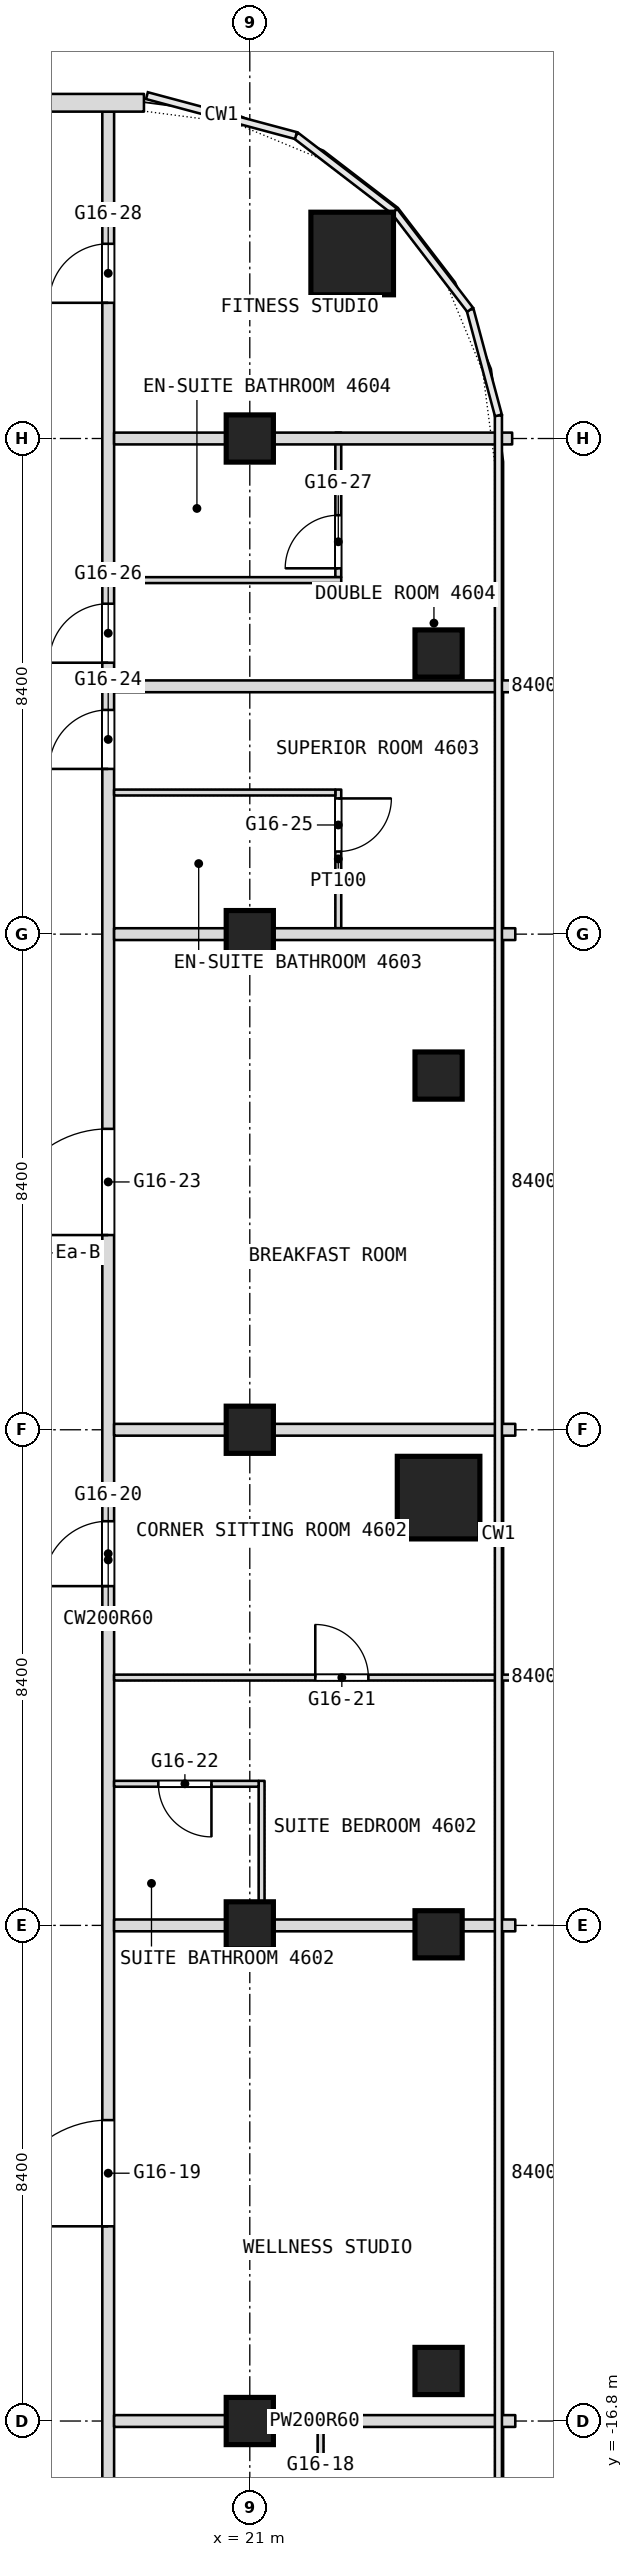
"""IFC4 building model, lengths in metres.
Left out: names, types, materials, properties, quantities, classifications, styles, units other than length and angle.
Written with IfcOpenShell. Run it as: python <this file> out.ifc"""

import sys

from ifc_helpers import new_model, si_unit, direction, frame, frame_2d, origin, origin_2d, place, context, subcontext, project, spatial, rectangle, extrude, element, fill, save


model = new_model("IFC4")
c1 = context("Model", 3, precision=1e-05, world=origin(), true_north=direction((0.0, 1.0)))
c2 = subcontext(c1, "Body", "Model", "MODEL_VIEW")
j1 = project(units=[si_unit("LENGTHUNIT", "METRE"), si_unit("PLANEANGLEUNIT", "RADIAN")], contexts=[c1])
p1 = place(None, origin())
s1 = spatial("IfcSite", under=j1, at=p1, CompositionType="ELEMENT")
p2 = place(p1, origin())
s2 = spatial("IfcBuilding", under=s1, at=p2, CompositionType="ELEMENT")
p3 = place(p2, frame((0.0, 0.0, 202.1)))
s3 = spatial("IfcBuildingStorey", under=s2, at=p3, CompositionType="ELEMENT", Elevation=202.1)
for number, where, z_axis, x_axis in (
    (1, (24.2, -1.15, 0.0), (0.0, 0.0, 1.0), (1.0, 0.0, 0.0)),
    (2, (22.736, 19.936, 0.0), (0.0, 0.0, 1.0), (1.0, 0.0, 0.0)),
):
    element("IfcColumn", number, at=place(p3, frame(where, z_axis=z_axis, x_axis=x_axis)), inside=s3, PredefinedType="COLUMN", context=c2, shape_type="SweptSolid", body=[
        extrude(rectangle(XDim=1.4, YDim=1.4, at=origin_2d()), origin(), (0.0, 0.0, 1.0), 3.6),
    ])
for number, where, z_axis, x_axis in (
    (3, (21.0, -16.8, 0.0), (0.0, 0.0, 1.0), (1.0, 0.0, 0.0)),
    (4, (21.0, -8.4, 0.0), (0.0, 0.0, 1.0), (1.0, 0.0, 0.0)),
    (5, (21.0, 0.0, 0.0), (0.0, 0.0, 1.0), (1.0, 0.0, 0.0)),
    (6, (21.0, 8.4, 0.0), (0.0, 0.0, 1.0), (1.0, 0.0, 0.0)),
    (7, (21.0, 16.8, 0.0), (0.0, 0.0, 1.0), (1.0, 0.0, 0.0)),
    (8, (24.2, 13.156, 0.0), (0.0, 0.0, 1.0), (1.0, 0.0, 0.0)),
    (9, (24.2, 6.003, 0.0), (0.0, 0.0, 1.0), (1.0, 0.0, 0.0)),
    (10, (24.2, -8.551, 0.0), (0.0, 0.0, 1.0), (1.0, 0.0, 0.0)),
    (11, (24.2, -15.952, 0.0), (0.0, 0.0, 1.0), (1.0, 0.0, 0.0)),
):
    element("IfcColumn", number, at=place(p3, frame(where, z_axis=z_axis, x_axis=x_axis)), inside=s3, PredefinedType="COLUMN", context=c2, shape_type="SweptSolid", body=[
        extrude(rectangle(XDim=0.8, YDim=0.8, at=origin_2d()), origin(), (0.0, 0.0, 1.0), 3.6),
    ])
p4 = place(p3, frame((22.5, 8.5, 0.0), z_axis=(0.0, 0.0, 1.0), x_axis=(0.0, 1.0, 0.0)))
e12 = element("IfcWall", 12, at=p4, inside=s3, PredefinedType="PARTITIONING", context=c2, shape_type="SweptSolid", body=[
    extrude(rectangle(XDim=2.35, YDim=0.1, at=frame_2d((1.175, 0.0))), origin(), (0.0, 0.0, 1.0), 3.34),
])
p5 = place(p4, frame((1.3, 0.0, 0.0)))
e13 = element("IfcOpeningElement", 13, at=p5, cuts=e12, PredefinedType="OPENING", context=c2, shape_type="SweptSolid", body=[
    extrude(rectangle(XDim=0.9, YDim=2.1, at=frame_2d((0.45, 1.05))), frame((0.0, 0.05, 0.0), z_axis=(0.0, -1.0, 0.0), x_axis=(1.0, 0.0, 0.0)), (0.0, 0.0, 1.0), 0.1),
])
p6 = place(p3, frame((22.5, 14.45, 0.0), z_axis=(0.0, 0.0, 1.0), x_axis=(0.0, 1.0, 0.0)))
e14 = element("IfcWall", 14, at=p6, inside=s3, PredefinedType="PARTITIONING", context=c2, shape_type="SweptSolid", body=[
    extrude(rectangle(XDim=2.45, YDim=0.1, at=frame_2d((1.225, 0.0))), origin(), (0.0, 0.0, 1.0), 3.34),
])
p7 = place(p6, frame((0.15, 0.0, 0.0)))
e15 = element("IfcOpeningElement", 15, at=p7, cuts=e14, PredefinedType="OPENING", context=c2, shape_type="SweptSolid", body=[
    extrude(rectangle(XDim=0.9, YDim=2.1, at=frame_2d((0.45, 1.05))), frame((0.0, 0.05, 0.0), z_axis=(0.0, -1.0, 0.0), x_axis=(1.0, 0.0, 0.0)), (0.0, 0.0, 1.0), 0.1),
])
p8 = place(p3, frame((22.2, -19.15, 0.0), z_axis=(0.0, 0.0, 1.0), x_axis=(0.0, 1.0, 0.0)))
e16 = element("IfcWall", 16, at=p8, inside=s3, PredefinedType="PARTITIONING", context=c2, shape_type="SweptSolid", body=[
    extrude(rectangle(XDim=2.45, YDim=0.1, at=frame_2d((1.225, 0.0))), origin(), (0.0, 0.0, 1.0), 3.34),
])
p9 = place(p8, frame((0.15, 0.0, 0.0)))
e17 = element("IfcOpeningElement", 17, at=p9, cuts=e16, PredefinedType="OPENING", context=c2, shape_type="SweptSolid", body=[
    extrude(rectangle(XDim=0.9, YDim=2.1, at=frame_2d((0.45, 1.05))), frame((0.0, 0.05, 0.0), z_axis=(0.0, -1.0, 0.0), x_axis=(1.0, 0.0, 0.0)), (0.0, 0.0, 1.0), 0.1),
])
p10 = place(p3, frame((21.2, -8.3, 0.0), z_axis=(0.0, 0.0, 1.0), x_axis=(0.0, 1.0, 0.0)))
e18 = element("IfcWall", 18, at=p10, inside=s3, PredefinedType="PARTITIONING", context=c2, shape_type="SweptSolid", body=[
    extrude(rectangle(XDim=2.35, YDim=0.1, at=frame_2d((1.175, 0.0))), origin(), (0.0, 0.0, 1.0), 3.34),
])
p11 = place(p3, frame((18.6, -26.751, 0.0), z_axis=(0.0, 0.0, 1.0), x_axis=(0.0, 1.0, 0.0)))
e19 = element("IfcWall", 19, at=p11, inside=s3, PredefinedType="PARTITIONING", context=c2, shape_type="SweptSolid", body=[
    extrude(rectangle(XDim=49.091, YDim=0.2, at=frame_2d((24.545, 0.0))), origin(), (0.0, 0.0, 1.0), 3.34),
])
p12 = place(p11, frame((4.576, 0.0, 0.0)))
e20 = element("IfcOpeningElement", 20, at=p12, cuts=e19, PredefinedType="OPENING", context=c2, shape_type="SweptSolid", body=[
    extrude(rectangle(XDim=1.1, YDim=2.1, at=frame_2d((0.55, 1.05))), frame((0.0, 0.1, 0.0), z_axis=(0.0, -1.0, 0.0), x_axis=(1.0, 0.0, 0.0)), (0.0, 0.0, 1.0), 0.2),
])
p13 = place(p11, frame((13.251, 0.0, 0.0)))
e21 = element("IfcOpeningElement", 21, at=p13, cuts=e19, PredefinedType="OPENING", context=c2, shape_type="SweptSolid", body=[
    extrude(rectangle(XDim=1.8, YDim=2.1, at=frame_2d((0.9, 1.05))), frame((0.0, 0.1, 0.0), z_axis=(0.0, -1.0, 0.0), x_axis=(1.0, 0.0, 0.0)), (0.0, 0.0, 1.0), 0.2),
])
p14 = place(p11, frame((24.101, 0.0, 0.0)))
e22 = element("IfcOpeningElement", 22, at=p14, cuts=e19, PredefinedType="OPENING", context=c2, shape_type="SweptSolid", body=[
    extrude(rectangle(XDim=1.1, YDim=2.1, at=frame_2d((0.55, 1.05))), frame((0.0, 0.1, 0.0), z_axis=(0.0, -1.0, 0.0), x_axis=(1.0, 0.0, 0.0)), (0.0, 0.0, 1.0), 0.2),
])
p15 = place(p11, frame((30.051, 0.0, 0.0)))
e23 = element("IfcOpeningElement", 23, at=p15, cuts=e19, PredefinedType="OPENING", context=c2, shape_type="SweptSolid", body=[
    extrude(rectangle(XDim=1.8, YDim=2.1, at=frame_2d((0.9, 1.05))), frame((0.0, 0.1, 0.0), z_axis=(0.0, -1.0, 0.0), x_axis=(1.0, 0.0, 0.0)), (0.0, 0.0, 1.0), 0.2),
])
p16 = place(p11, frame((37.951, 0.0, 0.0)))
e24 = element("IfcOpeningElement", 24, at=p16, cuts=e19, PredefinedType="OPENING", context=c2, shape_type="SweptSolid", body=[
    extrude(rectangle(XDim=1.0, YDim=2.1, at=frame_2d((0.5, 1.05))), frame((0.0, 0.1, 0.0), z_axis=(0.0, -1.0, 0.0), x_axis=(1.0, 0.0, 0.0)), (0.0, 0.0, 1.0), 0.2),
])
p17 = place(p11, frame((39.751, 0.0, 0.0)))
e25 = element("IfcOpeningElement", 25, at=p17, cuts=e19, PredefinedType="OPENING", context=c2, shape_type="SweptSolid", body=[
    extrude(rectangle(XDim=1.0, YDim=2.1, at=frame_2d((0.5, 1.05))), frame((0.0, 0.1, 0.0), z_axis=(0.0, -1.0, 0.0), x_axis=(1.0, 0.0, 0.0)), (0.0, 0.0, 1.0), 0.2),
])
p18 = place(p11, frame((45.851, 0.0, 0.0)))
e26 = element("IfcOpeningElement", 26, at=p18, cuts=e19, PredefinedType="OPENING", context=c2, shape_type="SweptSolid", body=[
    extrude(rectangle(XDim=1.0, YDim=2.1, at=frame_2d((0.5, 1.05))), frame((0.0, 0.1, 0.0), z_axis=(0.0, -1.0, 0.0), x_axis=(1.0, 0.0, 0.0)), (0.0, 0.0, 1.0), 0.2),
])
for number, where, z_axis, x_axis in (
    (27, (18.7, -16.8, 0.0), (0.0, 0.0, 1.0), (1.0, 0.0, 0.0)),
    (28, (18.7, -8.4, 0.0), (0.0, 0.0, 1.0), (1.0, 0.0, 0.0)),
):
    element("IfcWall", number, at=place(p3, frame(where, z_axis=z_axis, x_axis=x_axis)), inside=s3, PredefinedType="PARTITIONING", context=c2, shape_type="SweptSolid", body=[
        extrude(rectangle(XDim=6.8, YDim=0.2, at=frame_2d((3.4, 0.0))), origin(), (0.0, 0.0, 1.0), 2.94),
    ])
p19 = place(p3, frame((18.7, -6.0, 0.0), z_axis=(0.0, 0.0, 1.0), x_axis=(1.0, 0.0, 0.0)))
e29 = element("IfcWall", 29, at=p19, inside=s3, PredefinedType="PARTITIONING", context=c2, shape_type="SweptSolid", body=[
    extrude(rectangle(XDim=2.45, YDim=0.1, at=frame_2d((1.225, 0.0))), origin(), (0.0, 0.0, 1.0), 3.34),
])
p20 = place(p19, frame((0.75, 0.0, 0.0)))
e30 = element("IfcOpeningElement", 30, at=p20, cuts=e29, PredefinedType="OPENING", context=c2, shape_type="SweptSolid", body=[
    extrude(rectangle(XDim=0.9, YDim=2.1, at=frame_2d((0.45, 1.05))), frame((0.0, 0.05, 0.0), z_axis=(0.0, -1.0, 0.0), x_axis=(1.0, 0.0, 0.0)), (0.0, 0.0, 1.0), 0.1),
])
p21 = place(p3, frame((18.7, -4.2, 0.0), z_axis=(0.0, 0.0, 1.0), x_axis=(1.0, 0.0, 0.0)))
e31 = element("IfcWall", 31, at=p21, inside=s3, PredefinedType="PARTITIONING", context=c2, shape_type="SweptSolid", body=[
    extrude(rectangle(XDim=6.8, YDim=0.1, at=frame_2d((3.4, 0.0))), origin(), (0.0, 0.0, 1.0), 3.34),
])
p22 = place(p21, frame((3.41, 0.0, 0.0)))
e32 = element("IfcOpeningElement", 32, at=p22, cuts=e31, PredefinedType="OPENING", context=c2, shape_type="SweptSolid", body=[
    extrude(rectangle(XDim=0.9, YDim=2.1, at=frame_2d((0.45, 1.05))), frame((0.0, 0.05, 0.0), z_axis=(0.0, -1.0, 0.0), x_axis=(1.0, 0.0, 0.0)), (0.0, 0.0, 1.0), 0.1),
])
for number, where, z_axis, x_axis in (
    (33, (18.7, 0.0, 0.0), (0.0, 0.0, 1.0), (1.0, 0.0, 0.0)),
    (34, (18.7, 8.4, 0.0), (0.0, 0.0, 1.0), (1.0, 0.0, 0.0)),
):
    element("IfcWall", number, at=place(p3, frame(where, z_axis=z_axis, x_axis=x_axis)), inside=s3, PredefinedType="PARTITIONING", context=c2, shape_type="SweptSolid", body=[
        extrude(rectangle(XDim=6.8, YDim=0.2, at=frame_2d((3.4, 0.0))), origin(), (0.0, 0.0, 1.0), 2.94),
    ])
p23 = place(p3, frame((18.7, 10.8, 0.0), z_axis=(0.0, 0.0, 1.0), x_axis=(1.0, 0.0, 0.0)))
e35 = element("IfcWall", 35, at=p23, inside=s3, PredefinedType="PARTITIONING", context=c2, shape_type="SweptSolid", body=[
    extrude(rectangle(XDim=3.75, YDim=0.1, at=frame_2d((1.875, 0.0))), origin(), (0.0, 0.0, 1.0), 3.34),
])
p24 = place(p3, frame((18.7, 12.6, 0.0), z_axis=(0.0, 0.0, 1.0), x_axis=(1.0, 0.0, 0.0)))
e36 = element("IfcWall", 36, at=p24, inside=s3, PredefinedType="PARTITIONING", context=c2, shape_type="SweptSolid", body=[
    extrude(rectangle(XDim=6.8, YDim=0.2, at=frame_2d((3.4, 0.0))), origin(), (0.0, 0.0, 1.0), 3.34),
])
p25 = place(p3, frame((18.7, 14.4, 0.0), z_axis=(0.0, 0.0, 1.0), x_axis=(1.0, 0.0, 0.0)))
e37 = element("IfcWall", 37, at=p25, inside=s3, PredefinedType="PARTITIONING", context=c2, shape_type="SweptSolid", body=[
    extrude(rectangle(XDim=3.85, YDim=0.1, at=frame_2d((1.925, 0.0))), origin(), (0.0, 0.0, 1.0), 3.34),
])
p26 = place(p3, frame((18.7, 16.8, 0.0), z_axis=(0.0, 0.0, 1.0), x_axis=(1.0, 0.0, 0.0)))
e38 = element("IfcWall", 38, at=p26, inside=s3, PredefinedType="PARTITIONING", context=c2, shape_type="SweptSolid", body=[
    extrude(rectangle(XDim=6.747, YDim=0.2, at=frame_2d((3.374, 0.0))), origin(), (0.0, 0.0, 1.0), 2.94),
])
p27 = place(p3, frame((19.206, 22.49, 0.0), z_axis=(0.0, 0.0, 1.0), x_axis=(-1.0, 0.0, 0.0)))
e39 = element("IfcWall", 39, at=p27, inside=s3, PredefinedType="NOTDEFINED", context=c2, shape_type="SweptSolid", body=[
    extrude(rectangle(XDim=38.412, YDim=0.3, at=frame_2d((19.206, 0.0))), origin(), (0.0, 0.0, 1.0), 3.6),
])
p28 = place(p27, frame((3.306, 0.0, 0.9)))
e40 = element("IfcOpeningElement", 40, at=p28, cuts=e39, PredefinedType="OPENING", context=c2, shape_type="SweptSolid", body=[
    extrude(rectangle(XDim=2.4, YDim=2.1, at=frame_2d((1.2, 1.05))), frame((0.0, 0.15, 0.0), z_axis=(0.0, -1.0, 0.0), x_axis=(1.0, 0.0, 0.0)), (0.0, 0.0, 1.0), 0.3),
])
p29 = place(p27, frame((7.506, 0.0, 0.9)))
e41 = element("IfcOpeningElement", 41, at=p29, cuts=e39, PredefinedType="OPENING", context=c2, shape_type="SweptSolid", body=[
    extrude(rectangle(XDim=2.4, YDim=2.1, at=frame_2d((1.2, 1.05))), frame((0.0, 0.15, 0.0), z_axis=(0.0, -1.0, 0.0), x_axis=(1.0, 0.0, 0.0)), (0.0, 0.0, 1.0), 0.3),
])
p30 = place(p27, frame((11.706, 0.0, 0.9)))
e42 = element("IfcOpeningElement", 42, at=p30, cuts=e39, PredefinedType="OPENING", context=c2, shape_type="SweptSolid", body=[
    extrude(rectangle(XDim=2.4, YDim=2.1, at=frame_2d((1.2, 1.05))), frame((0.0, 0.15, 0.0), z_axis=(0.0, -1.0, 0.0), x_axis=(1.0, 0.0, 0.0)), (0.0, 0.0, 1.0), 0.3),
])
p31 = place(p27, frame((15.906, 0.0, 0.9)))
e43 = element("IfcOpeningElement", 43, at=p31, cuts=e39, PredefinedType="OPENING", context=c2, shape_type="SweptSolid", body=[
    extrude(rectangle(XDim=2.4, YDim=2.1, at=frame_2d((1.2, 1.05))), frame((0.0, 0.15, 0.0), z_axis=(0.0, -1.0, 0.0), x_axis=(1.0, 0.0, 0.0)), (0.0, 0.0, 1.0), 0.3),
])
p32 = place(p27, frame((20.106, 0.0, 0.9)))
e44 = element("IfcOpeningElement", 44, at=p32, cuts=e39, PredefinedType="OPENING", context=c2, shape_type="SweptSolid", body=[
    extrude(rectangle(XDim=2.4, YDim=2.1, at=frame_2d((1.2, 1.05))), frame((0.0, 0.15, 0.0), z_axis=(0.0, -1.0, 0.0), x_axis=(1.0, 0.0, 0.0)), (0.0, 0.0, 1.0), 0.3),
])
p33 = place(p27, frame((24.306, 0.0, 0.9)))
e45 = element("IfcOpeningElement", 45, at=p33, cuts=e39, PredefinedType="OPENING", context=c2, shape_type="SweptSolid", body=[
    extrude(rectangle(XDim=2.4, YDim=2.1, at=frame_2d((1.2, 1.05))), frame((0.0, 0.15, 0.0), z_axis=(0.0, -1.0, 0.0), x_axis=(1.0, 0.0, 0.0)), (0.0, 0.0, 1.0), 0.3),
])
p34 = place(p27, frame((28.506, 0.0, 0.9)))
e46 = element("IfcOpeningElement", 46, at=p34, cuts=e39, PredefinedType="OPENING", context=c2, shape_type="SweptSolid", body=[
    extrude(rectangle(XDim=2.4, YDim=2.1, at=frame_2d((1.2, 1.05))), frame((0.0, 0.15, 0.0), z_axis=(0.0, -1.0, 0.0), x_axis=(1.0, 0.0, 0.0)), (0.0, 0.0, 1.0), 0.3),
])
p35 = place(p27, frame((32.706, 0.0, 0.9)))
e47 = element("IfcOpeningElement", 47, at=p35, cuts=e39, PredefinedType="OPENING", context=c2, shape_type="SweptSolid", body=[
    extrude(rectangle(XDim=2.4, YDim=2.1, at=frame_2d((1.2, 1.05))), frame((0.0, 0.15, 0.0), z_axis=(0.0, -1.0, 0.0), x_axis=(1.0, 0.0, 0.0)), (0.0, 0.0, 1.0), 0.3),
])
p36 = place(p5, origin())
e48 = element("IfcDoor", 48, at=p36, inside=s3, OperationType="SINGLE_SWING_RIGHT", PredefinedType="DOOR", context=c2, shape_type="SweptSolid", body=[
    extrude(rectangle(XDim=0.9, YDim=2.1, at=frame_2d((0.45, 1.05))), frame((0.0, 0.025, 0.0), z_axis=(0.0, -1.0, 0.0), x_axis=(1.0, 0.0, 0.0)), (0.0, 0.0, 1.0), 0.05),
])
fill(e13, e48)
p37 = place(p7, origin())
e49 = element("IfcDoor", 49, at=p37, inside=s3, OperationType="SINGLE_SWING_LEFT", PredefinedType="DOOR", context=c2, shape_type="SweptSolid", body=[
    extrude(rectangle(XDim=0.9, YDim=2.1, at=frame_2d((0.45, 1.05))), frame((0.0, 0.025, 0.0), z_axis=(0.0, -1.0, 0.0), x_axis=(1.0, 0.0, 0.0)), (0.0, 0.0, 1.0), 0.05),
])
fill(e15, e49)
p38 = place(p13, origin())
e50 = element("IfcDoor", 50, at=p38, inside=s3, OperationType="DOUBLE_DOOR_SINGLE_SWING", PredefinedType="DOOR", context=c2, shape_type="SweptSolid", body=[
    extrude(rectangle(XDim=1.8, YDim=2.1, at=frame_2d((0.9, 1.05))), frame((0.0, 0.025, 0.0), z_axis=(0.0, -1.0, 0.0), x_axis=(1.0, 0.0, 0.0)), (0.0, 0.0, 1.0), 0.05),
])
fill(e21, e50)
p39 = place(p14, origin())
e51 = element("IfcDoor", 51, at=p39, inside=s3, OperationType="SINGLE_SWING_RIGHT", PredefinedType="DOOR", context=c2, shape_type="SweptSolid", body=[
    extrude(rectangle(XDim=1.1, YDim=2.1, at=frame_2d((0.55, 1.05))), frame((0.0, 0.025, 0.0), z_axis=(0.0, -1.0, 0.0), x_axis=(1.0, 0.0, 0.0)), (0.0, 0.0, 1.0), 0.05),
])
fill(e22, e51)
p40 = place(p15, origin())
e52 = element("IfcDoor", 52, at=p40, inside=s3, OperationType="DOUBLE_DOOR_SINGLE_SWING", PredefinedType="DOOR", context=c2, shape_type="SweptSolid", body=[
    extrude(rectangle(XDim=1.8, YDim=2.1, at=frame_2d((0.9, 1.05))), frame((0.0, 0.025, 0.0), z_axis=(0.0, -1.0, 0.0), x_axis=(1.0, 0.0, 0.0)), (0.0, 0.0, 1.0), 0.05),
])
fill(e23, e52)
p41 = place(p16, origin())
e53 = element("IfcDoor", 53, at=p41, inside=s3, OperationType="SINGLE_SWING_RIGHT", PredefinedType="DOOR", context=c2, shape_type="SweptSolid", body=[
    extrude(rectangle(XDim=1.0, YDim=2.1, at=frame_2d((0.5, 1.05))), frame((0.0, 0.025, 0.0), z_axis=(0.0, -1.0, 0.0), x_axis=(1.0, 0.0, 0.0)), (0.0, 0.0, 1.0), 0.05),
])
fill(e24, e53)
p42 = place(p17, origin())
e54 = element("IfcDoor", 54, at=p42, inside=s3, OperationType="SINGLE_SWING_RIGHT", PredefinedType="DOOR", context=c2, shape_type="SweptSolid", body=[
    extrude(rectangle(XDim=1.0, YDim=2.1, at=frame_2d((0.5, 1.05))), frame((0.0, 0.025, 0.0), z_axis=(0.0, -1.0, 0.0), x_axis=(1.0, 0.0, 0.0)), (0.0, 0.0, 1.0), 0.05),
])
fill(e25, e54)
p43 = place(p18, origin())
e55 = element("IfcDoor", 55, at=p43, inside=s3, OperationType="SINGLE_SWING_LEFT", PredefinedType="DOOR", context=c2, shape_type="SweptSolid", body=[
    extrude(rectangle(XDim=1.0, YDim=2.1, at=frame_2d((0.5, 1.05))), frame((0.0, 0.025, 0.0), z_axis=(0.0, -1.0, 0.0), x_axis=(1.0, 0.0, 0.0)), (0.0, 0.0, 1.0), 0.05),
])
fill(e26, e55)
p44 = place(p20, origin())
e56 = element("IfcDoor", 56, at=p44, inside=s3, OperationType="SINGLE_SWING_RIGHT", PredefinedType="DOOR", context=c2, shape_type="SweptSolid", body=[
    extrude(rectangle(XDim=0.9, YDim=2.1, at=frame_2d((0.45, 1.05))), frame((0.0, 0.025, 0.0), z_axis=(0.0, -1.0, 0.0), x_axis=(1.0, 0.0, 0.0)), (0.0, 0.0, 1.0), 0.05),
])
fill(e30, e56)
p45 = place(p22, origin())
e57 = element("IfcDoor", 57, at=p45, inside=s3, OperationType="SINGLE_SWING_RIGHT", PredefinedType="DOOR", context=c2, shape_type="SweptSolid", body=[
    extrude(rectangle(XDim=0.9, YDim=2.1, at=frame_2d((0.45, 1.05))), frame((0.0, 0.025, 0.0), z_axis=(0.0, -1.0, 0.0), x_axis=(1.0, 0.0, 0.0)), (0.0, 0.0, 1.0), 0.05),
])
fill(e32, e57)
save(model, sys.argv[1])
